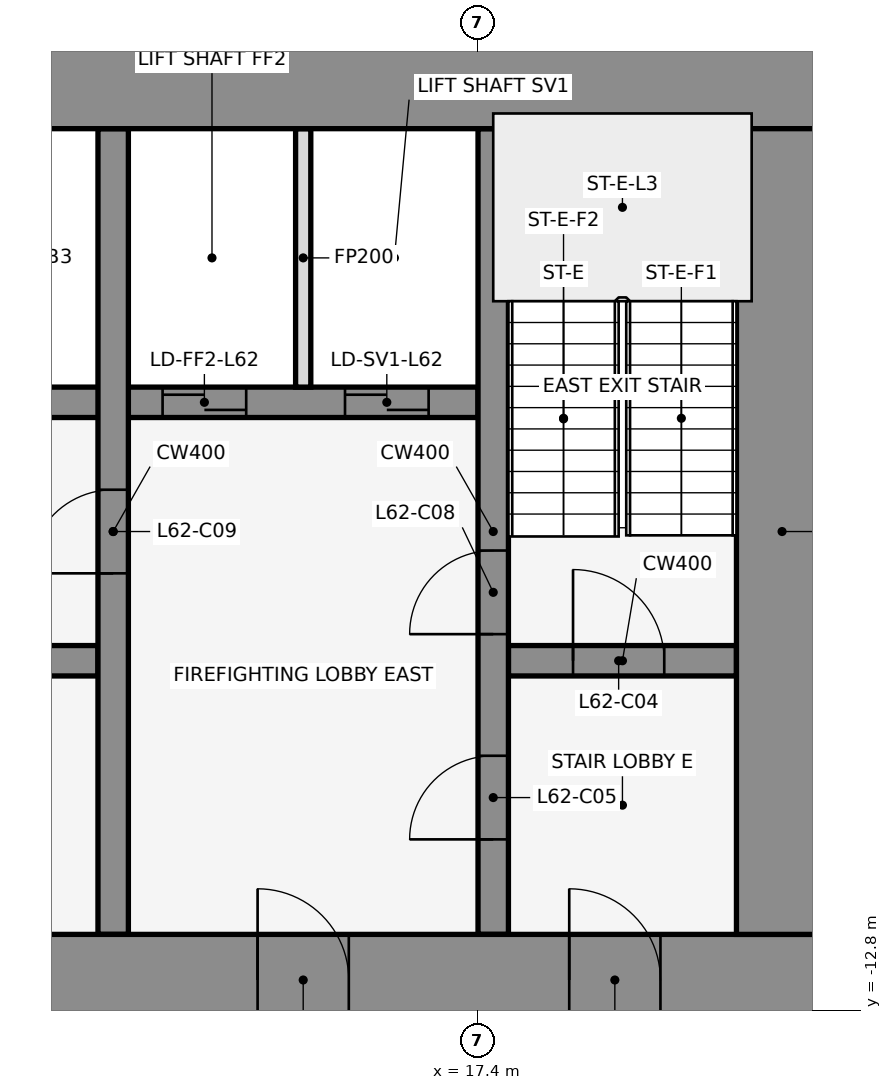
"""IFC4 building model, lengths in metres.
Left out: names, types, materials, properties, quantities, classifications, styles, units other than length and angle.
Written with IfcOpenShell. Run it as: python <this file> out.ifc"""

import sys

from ifc_helpers import new_model, si_unit, direction, frame, frame_2d, origin, place, context, subcontext, project, spatial, rectangle, extrude, element, fill, save


model = new_model("IFC4")
c1 = context("Model", 3, precision=1e-05, world=origin(), true_north=direction((0.0, 1.0)))
c2 = subcontext(c1, "Body", "Model", "MODEL_VIEW")
j1 = project(units=[si_unit("LENGTHUNIT", "METRE"), si_unit("PLANEANGLEUNIT", "RADIAN")], contexts=[c1])
p1 = place(None, origin())
s1 = spatial("IfcSite", under=j1, at=p1, CompositionType="ELEMENT")
p2 = place(p1, origin())
s2 = spatial("IfcBuilding", under=s1, at=p2, CompositionType="ELEMENT")
p3 = place(p2, frame((0.0, 0.0, 275.0)))
s3 = spatial("IfcBuildingStorey", under=s2, at=p3, CompositionType="ELEMENT", Elevation=275.0)
p4 = place(p3, frame((16.432, -0.105, 0.0), z_axis=(0.0, 0.0, 1.0), x_axis=(-0.83981312244, 0.542875602121, 0.0)))
e1 = element("IfcWall", 1, at=p4, inside=s3, PredefinedType="STANDARD", context=c2, shape_type="SweptSolid", body=[
    extrude(rectangle(XDim=2.183, YDim=0.25, at=frame_2d((1.091, 0.0))), origin(), (0.0, 0.0, 1.0), 4.05),
])
p5 = place(p3, frame((6.4, -8.2, 0.0), z_axis=(0.0, 0.0, 1.0), x_axis=(1.0, 0.0, 0.0)))
e2 = element("IfcWall", 2, at=p5, inside=s3, PredefinedType="SHEAR", context=c2, shape_type="SweptSolid", body=[
    extrude(rectangle(XDim=6.0, YDim=0.4, at=frame_2d((3.0, 0.0))), origin(), (0.0, 0.0, 1.0), 4.2),
])
p6 = place(p5, frame((2.65, 0.0, 0.0)))
e3 = element("IfcOpeningElement", 3, at=p6, cuts=e2, PredefinedType="OPENING", context=c2, shape_type="SweptSolid", body=[
    extrude(rectangle(XDim=0.9, YDim=2.1, at=frame_2d((0.45, 1.05))), frame((0.0, 0.212, 0.0), z_axis=(0.0, -1.0, 0.0), x_axis=(1.0, 0.0, 0.0)), (0.0, 0.0, 1.0), 0.424),
])
p7 = place(p3, frame((17.8, -8.2, 0.0), z_axis=(0.0, 0.0, 1.0), x_axis=(1.0, 0.0, 0.0)))
e4 = element("IfcWall", 4, at=p7, inside=s3, PredefinedType="SHEAR", context=c2, shape_type="SweptSolid", body=[
    extrude(rectangle(XDim=3.0, YDim=0.4, at=frame_2d((1.5, 0.0))), origin(), (0.0, 0.0, 1.0), 4.2),
])
p8 = place(p7, frame((0.85, 0.0, 0.0)))
e5 = element("IfcOpeningElement", 5, at=p8, cuts=e4, PredefinedType="OPENING", context=c2, shape_type="SweptSolid", body=[
    extrude(rectangle(XDim=1.2, YDim=2.1, at=frame_2d((0.6, 1.05))), frame((0.0, 0.212, 0.0), z_axis=(0.0, -1.0, 0.0), x_axis=(1.0, 0.0, 0.0)), (0.0, 0.0, 1.0), 0.424),
])
p9 = place(p3, frame((3.8, -4.8, 0.0), z_axis=(0.0, 0.0, 1.0), x_axis=(1.0, 0.0, 0.0)))
e6 = element("IfcWall", 6, at=p9, inside=s3, PredefinedType="SHEAR", context=c2, shape_type="SweptSolid", body=[
    extrude(rectangle(XDim=13.6, YDim=0.4, at=frame_2d((6.8, 0.0))), origin(), (0.0, 0.0, 1.0), 4.2),
])
p10 = place(p9, frame((0.75, 0.0, 0.0)))
e7 = element("IfcOpeningElement", 7, at=p10, cuts=e6, PredefinedType="OPENING", context=c2, shape_type="SweptSolid", body=[
    extrude(rectangle(XDim=1.2, YDim=2.1, at=frame_2d((0.6, 1.05))), frame((0.0, 0.212, 0.0), z_axis=(0.0, -1.0, 0.0), x_axis=(1.0, 0.0, 0.0)), (0.0, 0.0, 1.0), 0.424),
])
p11 = place(p9, frame((3.65, 0.0, 0.0)))
e8 = element("IfcOpeningElement", 8, at=p11, cuts=e6, PredefinedType="OPENING", context=c2, shape_type="SweptSolid", body=[
    extrude(rectangle(XDim=1.2, YDim=2.1, at=frame_2d((0.6, 1.05))), frame((0.0, 0.212, 0.0), z_axis=(0.0, -1.0, 0.0), x_axis=(1.0, 0.0, 0.0)), (0.0, 0.0, 1.0), 0.424),
])
p12 = place(p9, frame((6.65, 0.0, 0.0)))
e9 = element("IfcOpeningElement", 9, at=p12, cuts=e6, PredefinedType="OPENING", context=c2, shape_type="SweptSolid", body=[
    extrude(rectangle(XDim=1.2, YDim=2.1, at=frame_2d((0.6, 1.05))), frame((0.0, 0.212, 0.0), z_axis=(0.0, -1.0, 0.0), x_axis=(1.0, 0.0, 0.0)), (0.0, 0.0, 1.0), 0.424),
])
p13 = place(p9, frame((9.45, 0.0, 0.0)))
e10 = element("IfcOpeningElement", 10, at=p13, cuts=e6, PredefinedType="OPENING", context=c2, shape_type="SweptSolid", body=[
    extrude(rectangle(XDim=1.1, YDim=2.1, at=frame_2d((0.55, 1.05))), frame((0.0, 0.212, 0.0), z_axis=(0.0, -1.0, 0.0), x_axis=(1.0, 0.0, 0.0)), (0.0, 0.0, 1.0), 0.424),
])
p14 = place(p9, frame((11.85, 0.0, 0.0)))
e11 = element("IfcOpeningElement", 11, at=p14, cuts=e6, PredefinedType="OPENING", context=c2, shape_type="SweptSolid", body=[
    extrude(rectangle(XDim=1.1, YDim=2.1, at=frame_2d((0.55, 1.05))), frame((0.0, 0.212, 0.0), z_axis=(0.0, -1.0, 0.0), x_axis=(1.0, 0.0, 0.0)), (0.0, 0.0, 1.0), 0.424),
])
p15 = place(p3, frame((12.6, -11.8, 0.0), z_axis=(0.0, 0.0, 1.0), x_axis=(0.0, 1.0, 0.0)))
e12 = element("IfcWall", 12, at=p15, inside=s3, PredefinedType="SHEAR", context=c2, shape_type="SweptSolid", body=[
    extrude(rectangle(XDim=10.6, YDim=0.4, at=frame_2d((5.3, 0.0))), origin(), (0.0, 0.0, 1.0), 4.2),
])
p16 = place(p15, frame((4.75, 0.0, 0.0)))
e13 = element("IfcOpeningElement", 13, at=p16, cuts=e12, PredefinedType="OPENING", context=c2, shape_type="SweptSolid", body=[
    extrude(rectangle(XDim=1.1, YDim=2.1, at=frame_2d((0.55, 1.05))), frame((0.0, 0.212, 0.0), z_axis=(0.0, -1.0, 0.0), x_axis=(1.0, 0.0, 0.0)), (0.0, 0.0, 1.0), 0.424),
])
p17 = place(p3, frame((15.1, -4.6, 0.0), z_axis=(0.0, 0.0, 1.0), x_axis=(0.0, 1.0, 0.0)))
e14 = element("IfcWall", 14, at=p17, inside=s3, PredefinedType="PARTITIONING", context=c2, shape_type="SweptSolid", body=[
    extrude(rectangle(XDim=3.4, YDim=0.2, at=frame_2d((1.7, 0.0))), origin(), (0.0, 0.0, 1.0), 3.118),
])
p18 = place(p3, frame((17.6, -11.8, 0.0), z_axis=(0.0, 0.0, 1.0), x_axis=(0.0, 1.0, 0.0)))
e15 = element("IfcWall", 15, at=p18, inside=s3, PredefinedType="SHEAR", context=c2, shape_type="SweptSolid", body=[
    extrude(rectangle(XDim=10.6, YDim=0.4, at=frame_2d((5.3, 0.0))), origin(), (0.0, 0.0, 1.0), 4.2),
])
p19 = place(p18, frame((1.25, 0.0, 0.0)))
e16 = element("IfcOpeningElement", 16, at=p19, cuts=e15, PredefinedType="OPENING", context=c2, shape_type="SweptSolid", body=[
    extrude(rectangle(XDim=1.1, YDim=2.1, at=frame_2d((0.55, 1.05))), frame((0.0, 0.212, 0.0), z_axis=(0.0, -1.0, 0.0), x_axis=(1.0, 0.0, 0.0)), (0.0, 0.0, 1.0), 0.424),
])
p20 = place(p18, frame((3.95, 0.0, 0.0)))
e17 = element("IfcOpeningElement", 17, at=p20, cuts=e15, PredefinedType="OPENING", context=c2, shape_type="SweptSolid", body=[
    extrude(rectangle(XDim=1.1, YDim=2.1, at=frame_2d((0.55, 1.05))), frame((0.0, 0.212, 0.0), z_axis=(0.0, -1.0, 0.0), x_axis=(1.0, 0.0, 0.0)), (0.0, 0.0, 1.0), 0.424),
])
p21 = place(p3, frame((-22.0, -0.6, 0.0), z_axis=(0.0, 0.0, 1.0), x_axis=(1.0, 0.0, 0.0)))
e18 = element("IfcWall", 18, at=p21, inside=s3, PredefinedType="SHEAR", context=c2, shape_type="SweptSolid", body=[
    extrude(rectangle(XDim=44.0, YDim=1.2, at=frame_2d((22.0, 0.0))), origin(), (0.0, 0.0, 1.0), 4.2),
])
p22 = place(p21, frame((18.55, 0.0, 0.0)))
e19 = element("IfcOpeningElement", 19, at=p22, cuts=e18, PredefinedType="OPENING", context=c2, shape_type="SweptSolid", body=[
    extrude(rectangle(XDim=0.9, YDim=2.1, at=frame_2d((0.45, 1.05))), frame((0.0, 0.612, 0.0), z_axis=(0.0, -1.0, 0.0), x_axis=(1.0, 0.0, 0.0)), (0.0, 0.0, 1.0), 1.224),
])
p23 = place(p21, frame((24.55, 0.0, 0.0)))
e20 = element("IfcOpeningElement", 20, at=p23, cuts=e18, PredefinedType="OPENING", context=c2, shape_type="SweptSolid", body=[
    extrude(rectangle(XDim=0.9, YDim=2.1, at=frame_2d((0.45, 1.05))), frame((0.0, 0.612, 0.0), z_axis=(0.0, -1.0, 0.0), x_axis=(1.0, 0.0, 0.0)), (0.0, 0.0, 1.0), 1.224),
])
p24 = place(p3, frame((-22.0, -12.4, 0.0), z_axis=(0.0, 0.0, 1.0), x_axis=(1.0, 0.0, 0.0)))
e21 = element("IfcWall", 21, at=p24, inside=s3, PredefinedType="SHEAR", context=c2, shape_type="SweptSolid", body=[
    extrude(rectangle(XDim=44.0, YDim=1.2, at=frame_2d((22.0, 0.0))), origin(), (0.0, 0.0, 1.0), 4.2),
])
p25 = place(p24, frame((2.2, 0.0, 0.0)))
e22 = element("IfcOpeningElement", 22, at=p25, cuts=e21, PredefinedType="OPENING", context=c2, shape_type="SweptSolid", body=[
    extrude(rectangle(XDim=1.2, YDim=2.1, at=frame_2d((0.6, 1.05))), frame((0.0, 0.612, 0.0), z_axis=(0.0, -1.0, 0.0), x_axis=(1.0, 0.0, 0.0)), (0.0, 0.0, 1.0), 1.224),
])
p26 = place(p24, frame((21.4, 0.0, 0.0)))
e23 = element("IfcOpeningElement", 23, at=p26, cuts=e21, PredefinedType="OPENING", context=c2, shape_type="SweptSolid", body=[
    extrude(rectangle(XDim=1.2, YDim=2.1, at=frame_2d((0.6, 1.05))), frame((0.0, 0.612, 0.0), z_axis=(0.0, -1.0, 0.0), x_axis=(1.0, 0.0, 0.0)), (0.0, 0.0, 1.0), 1.224),
])
p27 = place(p24, frame((40.6, 0.0, 0.0)))
e24 = element("IfcOpeningElement", 24, at=p27, cuts=e21, PredefinedType="OPENING", context=c2, shape_type="SweptSolid", body=[
    extrude(rectangle(XDim=1.2, YDim=2.1, at=frame_2d((0.6, 1.05))), frame((0.0, 0.612, 0.0), z_axis=(0.0, -1.0, 0.0), x_axis=(1.0, 0.0, 0.0)), (0.0, 0.0, 1.0), 1.224),
])
p28 = place(p24, frame((16.0, 0.0, 0.0)))
e25 = element("IfcOpeningElement", 25, at=p28, cuts=e21, PredefinedType="OPENING", context=c2, shape_type="SweptSolid", body=[
    extrude(rectangle(XDim=1.8, YDim=2.1, at=frame_2d((0.9, 1.05))), frame((0.0, 0.612, 0.0), z_axis=(0.0, -1.0, 0.0), x_axis=(1.0, 0.0, 0.0)), (0.0, 0.0, 1.0), 1.224),
])
p29 = place(p24, frame((6.3, 0.0, 0.0)))
e26 = element("IfcOpeningElement", 26, at=p29, cuts=e21, PredefinedType="OPENING", context=c2, shape_type="SweptSolid", body=[
    extrude(rectangle(XDim=1.2, YDim=2.1, at=frame_2d((0.6, 1.05))), frame((0.0, 0.612, 0.0), z_axis=(0.0, -1.0, 0.0), x_axis=(1.0, 0.0, 0.0)), (0.0, 0.0, 1.0), 1.224),
])
p30 = place(p24, frame((26.2, 0.0, 0.0)))
e27 = element("IfcOpeningElement", 27, at=p30, cuts=e21, PredefinedType="OPENING", context=c2, shape_type="SweptSolid", body=[
    extrude(rectangle(XDim=1.8, YDim=2.1, at=frame_2d((0.9, 1.05))), frame((0.0, 0.612, 0.0), z_axis=(0.0, -1.0, 0.0), x_axis=(1.0, 0.0, 0.0)), (0.0, 0.0, 1.0), 1.224),
])
p31 = place(p24, frame((36.5, 0.0, 0.0)))
e28 = element("IfcOpeningElement", 28, at=p31, cuts=e21, PredefinedType="OPENING", context=c2, shape_type="SweptSolid", body=[
    extrude(rectangle(XDim=1.2, YDim=2.1, at=frame_2d((0.6, 1.05))), frame((0.0, 0.612, 0.0), z_axis=(0.0, -1.0, 0.0), x_axis=(1.0, 0.0, 0.0)), (0.0, 0.0, 1.0), 1.224),
])
p32 = place(p3, frame((21.4, -11.8, 0.0), z_axis=(0.0, 0.0, 1.0), x_axis=(0.0, 1.0, 0.0)))
e29 = element("IfcWall", 29, at=p32, inside=s3, PredefinedType="SHEAR", context=c2, shape_type="SweptSolid", body=[
    extrude(rectangle(XDim=10.6, YDim=1.2, at=frame_2d((5.3, 0.0))), origin(), (0.0, 0.0, 1.0), 4.2),
])
p33 = place(p8, origin())
e30 = element("IfcDoor", 30, at=p33, inside=s3, OperationType="SINGLE_SWING_RIGHT", PredefinedType="DOOR", context=c2, shape_type="SweptSolid", body=[
    extrude(rectangle(XDim=1.2, YDim=2.1, at=frame_2d((0.6, 1.05))), frame((0.0, 0.025, 0.0), z_axis=(0.0, -1.0, 0.0), x_axis=(1.0, 0.0, 0.0)), (0.0, 0.0, 1.0), 0.05),
])
fill(e5, e30)
p34 = place(p19, origin())
e31 = element("IfcDoor", 31, at=p34, inside=s3, OperationType="SINGLE_SWING_LEFT", PredefinedType="DOOR", context=c2, shape_type="SweptSolid", body=[
    extrude(rectangle(XDim=1.1, YDim=2.1, at=frame_2d((0.55, 1.05))), frame((0.0, 0.025, 0.0), z_axis=(0.0, -1.0, 0.0), x_axis=(1.0, 0.0, 0.0)), (0.0, 0.0, 1.0), 0.05),
])
fill(e16, e31)
p35 = place(p13, origin())
e32 = element("IfcDoor", 32, at=p35, inside=s3, OperationType="DOUBLE_DOOR_SLIDING", PredefinedType="DOOR", context=c2, shape_type="SweptSolid", body=[
    extrude(rectangle(XDim=1.1, YDim=2.1, at=frame_2d((0.55, 1.05))), frame((0.0, 0.025, 0.0), z_axis=(0.0, -1.0, 0.0), x_axis=(1.0, 0.0, 0.0)), (0.0, 0.0, 1.0), 0.05),
])
fill(e10, e32)
p36 = place(p14, origin())
e33 = element("IfcDoor", 33, at=p36, inside=s3, OperationType="DOUBLE_DOOR_SLIDING", PredefinedType="DOOR", context=c2, shape_type="SweptSolid", body=[
    extrude(rectangle(XDim=1.1, YDim=2.1, at=frame_2d((0.55, 1.05))), frame((0.0, 0.025, 0.0), z_axis=(0.0, -1.0, 0.0), x_axis=(1.0, 0.0, 0.0)), (0.0, 0.0, 1.0), 0.05),
])
fill(e11, e33)
p37 = place(p20, origin())
e34 = element("IfcDoor", 34, at=p37, inside=s3, OperationType="SINGLE_SWING_RIGHT", PredefinedType="DOOR", context=c2, shape_type="SweptSolid", body=[
    extrude(rectangle(XDim=1.1, YDim=2.1, at=frame_2d((0.55, 1.05))), frame((0.0, 0.025, 0.0), z_axis=(0.0, -1.0, 0.0), x_axis=(1.0, 0.0, 0.0)), (0.0, 0.0, 1.0), 0.05),
])
fill(e17, e34)
p38 = place(p16, frame((1.1, 0.0, 0.0), z_axis=(0.0, 0.0, 1.0), x_axis=(-1.0, 0.0, 0.0)))
e35 = element("IfcDoor", 35, at=p38, inside=s3, OperationType="SINGLE_SWING_RIGHT", PredefinedType="DOOR", context=c2, shape_type="SweptSolid", body=[
    extrude(rectangle(XDim=1.1, YDim=2.1, at=frame_2d((0.55, 1.05))), frame((0.0, 0.025, 0.0), z_axis=(0.0, -1.0, 0.0), x_axis=(1.0, 0.0, 0.0)), (0.0, 0.0, 1.0), 0.05),
])
fill(e13, e35)
p39 = place(p27, frame((1.2, 0.0, 0.0), z_axis=(0.0, 0.0, 1.0), x_axis=(-1.0, 0.0, 0.0)))
e36 = element("IfcDoor", 36, at=p39, inside=s3, OperationType="SINGLE_SWING_RIGHT", PredefinedType="DOOR", context=c2, shape_type="SweptSolid", body=[
    extrude(rectangle(XDim=1.2, YDim=2.1, at=frame_2d((0.6, 1.05))), frame((0.0, 0.025, 0.0), z_axis=(0.0, -1.0, 0.0), x_axis=(1.0, 0.0, 0.0)), (0.0, 0.0, 1.0), 0.05),
])
fill(e24, e36)
p40 = place(p31, frame((1.2, 0.0, 0.0), z_axis=(0.0, 0.0, 1.0), x_axis=(-1.0, 0.0, 0.0)))
e37 = element("IfcDoor", 37, at=p40, inside=s3, OperationType="SINGLE_SWING_RIGHT", PredefinedType="DOOR", context=c2, shape_type="SweptSolid", body=[
    extrude(rectangle(XDim=1.2, YDim=2.1, at=frame_2d((0.6, 1.05))), frame((0.0, 0.025, 0.0), z_axis=(0.0, -1.0, 0.0), x_axis=(1.0, 0.0, 0.0)), (0.0, 0.0, 1.0), 0.05),
])
fill(e28, e37)
save(model, sys.argv[1])
